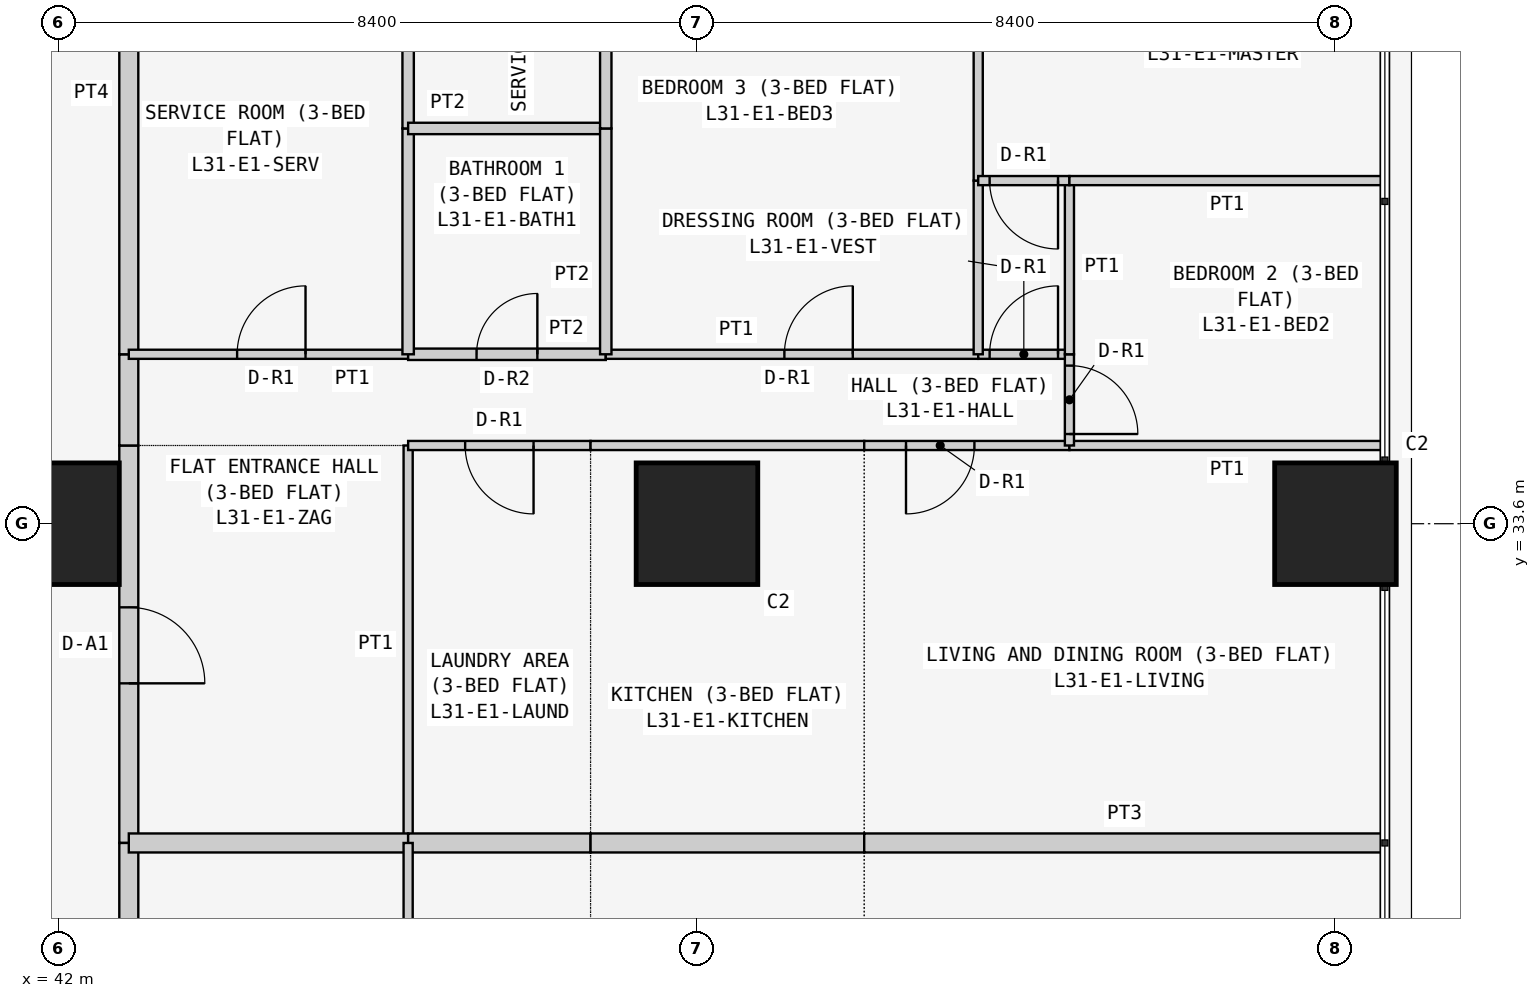
"""IFC4 building model, lengths in metres.
Left out: names, types, materials, properties, quantities, classifications, styles, units other than length and angle.
Written with IfcOpenShell. Run it as: python <this file> out.ifc"""

import sys

from ifc_helpers import new_model, si_unit, direction, frame, frame_2d, origin, origin_2d, place, context, subcontext, project, spatial, rectangle, extrude, element, fill, save


model = new_model("IFC4")
c1 = context("Model", 3, precision=1e-05, world=origin(), true_north=direction((0.0, 1.0)))
c2 = subcontext(c1, "Body", "Model", "MODEL_VIEW")
j1 = project(units=[si_unit("LENGTHUNIT", "METRE"), si_unit("PLANEANGLEUNIT", "RADIAN")], contexts=[c1])
p1 = place(None, origin())
s1 = spatial("IfcSite", under=j1, at=p1, CompositionType="ELEMENT")
p2 = place(p1, origin())
s2 = spatial("IfcBuilding", under=s1, at=p2, CompositionType="ELEMENT")
p3 = place(p2, frame((0.0, 0.0, 123.3)))
s3 = spatial("IfcBuildingStorey", under=s2, at=p3, CompositionType="ELEMENT", Elevation=123.3)
for number, where, z_axis, x_axis in (
    (1, (42.0, 33.6, 0.0), (0.0, 0.0, 1.0), (1.0, 0.0, 0.0)),
    (2, (50.4, 33.6, 0.0), (0.0, 0.0, 1.0), (1.0, 0.0, 0.0)),
    (3, (58.8, 33.6, 0.0), (0.0, 0.0, 1.0), (1.0, 0.0, 0.0)),
):
    element("IfcColumn", number, at=place(p3, frame(where, z_axis=z_axis, x_axis=x_axis)), inside=s3, PredefinedType="COLUMN", context=c2, shape_type="SweptSolid", body=[
        extrude(rectangle(XDim=1.6, YDim=1.6, at=origin_2d()), origin(), (0.0, 0.0, 1.0), 3.6),
    ])
p4 = place(p3, frame((42.925, 34.629, 0.0), z_axis=(0.0, 0.0, 1.0), x_axis=(0.0, -1.0, 0.0)))
e4 = element("IfcWall", 4, at=p4, inside=s3, PredefinedType="PARTITIONING", context=c2, shape_type="SweptSolid", body=[
    extrude(rectangle(XDim=5.229, YDim=0.25, at=frame_2d((2.615, 0.0))), origin(), (0.0, 0.0, 1.0), 3.45),
])
p5 = place(p4, frame((2.129, 0.0, 0.0)))
e5 = element("IfcOpeningElement", 5, at=p5, cuts=e4, PredefinedType="OPENING", context=c2, shape_type="SweptSolid", body=[
    extrude(rectangle(XDim=1.0, YDim=2.1, at=frame_2d((0.5, 1.05))), frame((0.0, 0.135, 0.0), z_axis=(0.0, -1.0, 0.0), x_axis=(1.0, 0.0, 0.0)), (0.0, 0.0, 1.0), 0.27),
])
p6 = place(p3, frame((42.925, 35.829, 0.0), z_axis=(0.0, 0.0, 1.0), x_axis=(0.0, -1.0, 0.0)))
e6 = element("IfcWall", 6, at=p6, inside=s3, PredefinedType="PARTITIONING", context=c2, shape_type="SweptSolid", body=[
    extrude(rectangle(XDim=1.2, YDim=0.25, at=frame_2d((0.6, 0.0))), origin(), (0.0, 0.0, 1.0), 3.45),
])
p7 = place(p3, frame((42.925, 42.7, 0.0), z_axis=(0.0, 0.0, 1.0), x_axis=(0.0, -1.0, 0.0)))
e7 = element("IfcWall", 7, at=p7, inside=s3, PredefinedType="PARTITIONING", context=c2, shape_type="SweptSolid", body=[
    extrude(rectangle(XDim=6.871, YDim=0.25, at=frame_2d((3.436, 0.0))), origin(), (0.0, 0.0, 1.0), 3.45),
])
p8 = place(p3, frame((42.925, 29.4, 0.0), z_axis=(0.0, 0.0, 1.0), x_axis=(0.0, -1.0, 0.0)))
e8 = element("IfcWall", 8, at=p8, inside=s3, PredefinedType="PARTITIONING", context=c2, shape_type="SweptSolid", body=[
    extrude(rectangle(XDim=5.229, YDim=0.25, at=frame_2d((2.615, 0.0))), origin(), (0.0, 0.0, 1.0), 3.45),
])
p9 = place(p8, frame((2.1, 0.0, 0.0)))
e9 = element("IfcOpeningElement", 9, at=p9, cuts=e8, PredefinedType="OPENING", context=c2, shape_type="SweptSolid", body=[
    extrude(rectangle(XDim=1.0, YDim=2.1, at=frame_2d((0.5, 1.05))), frame((0.0, 0.135, 0.0), z_axis=(0.0, -1.0, 0.0), x_axis=(1.0, 0.0, 0.0)), (0.0, 0.0, 1.0), 0.27),
])
p10 = place(p3, frame((46.6, 29.4, 0.0), z_axis=(0.0, 0.0, 1.0), x_axis=(0.0, 1.0, 0.0)))
e10 = element("IfcWall", 10, at=p10, inside=s3, PredefinedType="PARTITIONING", context=c2, shape_type="SweptSolid", body=[
    extrude(rectangle(XDim=5.229, YDim=0.12, at=frame_2d((2.615, 0.0))), origin(), (0.0, 0.0, 1.0), 3.45),
])
p11 = place(p3, frame((42.925, 29.4, 0.0), z_axis=(0.0, 0.0, 1.0), x_axis=(1.0, 0.0, 0.0)))
e11 = element("IfcWall", 11, at=p11, inside=s3, PredefinedType="PARTITIONING", context=c2, shape_type="SweptSolid", body=[
    extrude(rectangle(XDim=3.675, YDim=0.25, at=frame_2d((1.837, 0.0))), origin(), (0.0, 0.0, 1.0), 3.45),
])
p12 = place(p3, frame((49.0, 34.629, 0.0), z_axis=(0.0, 0.0, 1.0), x_axis=(-1.0, 0.0, 0.0)))
e12 = element("IfcWall", 12, at=p12, inside=s3, PredefinedType="PARTITIONING", context=c2, shape_type="SweptSolid", body=[
    extrude(rectangle(XDim=2.4, YDim=0.12, at=frame_2d((1.2, 0.0))), origin(), (0.0, 0.0, 1.0), 3.45),
])
p13 = place(p12, frame((0.75, 0.0, 0.0)))
e13 = element("IfcOpeningElement", 13, at=p13, cuts=e12, PredefinedType="OPENING", context=c2, shape_type="SweptSolid", body=[
    extrude(rectangle(XDim=0.9, YDim=2.1, at=frame_2d((0.45, 1.05))), frame((0.0, 0.07, 0.0), z_axis=(0.0, -1.0, 0.0), x_axis=(1.0, 0.0, 0.0)), (0.0, 0.0, 1.0), 0.14),
])
p14 = place(p3, frame((46.6, 29.4, 0.0), z_axis=(0.0, 0.0, 1.0), x_axis=(1.0, 0.0, 0.0)))
e14 = element("IfcWall", 14, at=p14, inside=s3, PredefinedType="PARTITIONING", context=c2, shape_type="SweptSolid", body=[
    extrude(rectangle(XDim=2.4, YDim=0.25, at=frame_2d((1.2, 0.0))), origin(), (0.0, 0.0, 1.0), 3.45),
])
p15 = place(p3, frame((52.6, 34.629, 0.0), z_axis=(0.0, 0.0, 1.0), x_axis=(-1.0, 0.0, 0.0)))
e15 = element("IfcWall", 15, at=p15, inside=s3, PredefinedType="PARTITIONING", context=c2, shape_type="SweptSolid", body=[
    extrude(rectangle(XDim=3.6, YDim=0.12, at=frame_2d((1.8, 0.0))), origin(), (0.0, 0.0, 1.0), 3.45),
])
p16 = place(p3, frame((49.0, 29.4, 0.0), z_axis=(0.0, 0.0, 1.0), x_axis=(1.0, 0.0, 0.0)))
e16 = element("IfcWall", 16, at=p16, inside=s3, PredefinedType="PARTITIONING", context=c2, shape_type="SweptSolid", body=[
    extrude(rectangle(XDim=3.6, YDim=0.25, at=frame_2d((1.8, 0.0))), origin(), (0.0, 0.0, 1.0), 3.45),
])
p17 = place(p3, frame((55.3, 34.629, 0.0), z_axis=(0.0, 0.0, 1.0), x_axis=(-1.0, 0.0, 0.0)))
e17 = element("IfcWall", 17, at=p17, inside=s3, PredefinedType="PARTITIONING", context=c2, shape_type="SweptSolid", body=[
    extrude(rectangle(XDim=2.7, YDim=0.12, at=frame_2d((1.35, 0.0))), origin(), (0.0, 0.0, 1.0), 3.45),
])
p18 = place(p17, frame((1.25, 0.0, 0.0)))
e18 = element("IfcOpeningElement", 18, at=p18, cuts=e17, PredefinedType="OPENING", context=c2, shape_type="SweptSolid", body=[
    extrude(rectangle(XDim=0.9, YDim=2.1, at=frame_2d((0.45, 1.05))), frame((0.0, 0.07, 0.0), z_axis=(0.0, -1.0, 0.0), x_axis=(1.0, 0.0, 0.0)), (0.0, 0.0, 1.0), 0.14),
])
p19 = place(p3, frame((59.45, 34.629, 0.0), z_axis=(0.0, 0.0, 1.0), x_axis=(-1.0, 0.0, 0.0)))
e19 = element("IfcWall", 19, at=p19, inside=s3, PredefinedType="PARTITIONING", context=c2, shape_type="SweptSolid", body=[
    extrude(rectangle(XDim=4.15, YDim=0.12, at=frame_2d((2.075, 0.0))), origin(), (0.0, 0.0, 1.0), 3.45),
])
p20 = place(p3, frame((52.6, 29.4, 0.0), z_axis=(0.0, 0.0, 1.0), x_axis=(1.0, 0.0, 0.0)))
e20 = element("IfcWall", 20, at=p20, inside=s3, PredefinedType="PARTITIONING", context=c2, shape_type="SweptSolid", body=[
    extrude(rectangle(XDim=6.85, YDim=0.25, at=frame_2d((3.425, 0.0))), origin(), (0.0, 0.0, 1.0), 3.45),
])
p21 = place(p3, frame((46.6, 35.829, 0.0), z_axis=(0.0, 0.0, 1.0), x_axis=(-1.0, 0.0, 0.0)))
e21 = element("IfcWall", 21, at=p21, inside=s3, PredefinedType="PARTITIONING", context=c2, shape_type="SweptSolid", body=[
    extrude(rectangle(XDim=3.675, YDim=0.12, at=frame_2d((1.837, 0.0))), origin(), (0.0, 0.0, 1.0), 3.45),
])
p22 = place(p21, frame((1.35, 0.0, 0.0)))
e22 = element("IfcOpeningElement", 22, at=p22, cuts=e21, PredefinedType="OPENING", context=c2, shape_type="SweptSolid", body=[
    extrude(rectangle(XDim=0.9, YDim=2.1, at=frame_2d((0.45, 1.05))), frame((0.0, 0.07, 0.0), z_axis=(0.0, -1.0, 0.0), x_axis=(1.0, 0.0, 0.0)), (0.0, 0.0, 1.0), 0.14),
])
p23 = place(p3, frame((49.2, 35.829, 0.0), z_axis=(0.0, 0.0, 1.0), x_axis=(-1.0, 0.0, 0.0)))
e23 = element("IfcWall", 23, at=p23, inside=s3, PredefinedType="PARTITIONING", context=c2, shape_type="SweptSolid", body=[
    extrude(rectangle(XDim=2.6, YDim=0.15, at=frame_2d((1.3, 0.0))), origin(), (0.0, 0.0, 1.0), 3.45),
])
p24 = place(p23, frame((0.9, 0.0, 0.0)))
e24 = element("IfcOpeningElement", 24, at=p24, cuts=e23, PredefinedType="OPENING", context=c2, shape_type="SweptSolid", body=[
    extrude(rectangle(XDim=0.8, YDim=2.1, at=frame_2d((0.4, 1.05))), frame((0.0, 0.085, 0.0), z_axis=(0.0, -1.0, 0.0), x_axis=(1.0, 0.0, 0.0)), (0.0, 0.0, 1.0), 0.17),
])
p25 = place(p3, frame((54.1, 35.829, 0.0), z_axis=(0.0, 0.0, 1.0), x_axis=(-1.0, 0.0, 0.0)))
e25 = element("IfcWall", 25, at=p25, inside=s3, PredefinedType="PARTITIONING", context=c2, shape_type="SweptSolid", body=[
    extrude(rectangle(XDim=4.9, YDim=0.12, at=frame_2d((2.45, 0.0))), origin(), (0.0, 0.0, 1.0), 3.45),
])
p26 = place(p25, frame((1.65, 0.0, 0.0)))
e26 = element("IfcOpeningElement", 26, at=p26, cuts=e25, PredefinedType="OPENING", context=c2, shape_type="SweptSolid", body=[
    extrude(rectangle(XDim=0.9, YDim=2.1, at=frame_2d((0.45, 1.05))), frame((0.0, 0.07, 0.0), z_axis=(0.0, -1.0, 0.0), x_axis=(1.0, 0.0, 0.0)), (0.0, 0.0, 1.0), 0.14),
])
p27 = place(p3, frame((55.3, 35.829, 0.0), z_axis=(0.0, 0.0, 1.0), x_axis=(-1.0, 0.0, 0.0)))
e27 = element("IfcWall", 27, at=p27, inside=s3, PredefinedType="PARTITIONING", context=c2, shape_type="SweptSolid", body=[
    extrude(rectangle(XDim=1.2, YDim=0.12, at=frame_2d((0.6, 0.0))), origin(), (0.0, 0.0, 1.0), 3.45),
])
p28 = place(p27, frame((0.15, 0.0, 0.0)))
e28 = element("IfcOpeningElement", 28, at=p28, cuts=e27, PredefinedType="OPENING", context=c2, shape_type="SweptSolid", body=[
    extrude(rectangle(XDim=0.9, YDim=2.1, at=frame_2d((0.45, 1.05))), frame((0.0, 0.07, 0.0), z_axis=(0.0, -1.0, 0.0), x_axis=(1.0, 0.0, 0.0)), (0.0, 0.0, 1.0), 0.14),
])
p29 = place(p3, frame((55.3, 34.629, 0.0), z_axis=(0.0, 0.0, 1.0), x_axis=(0.0, 1.0, 0.0)))
e29 = element("IfcWall", 29, at=p29, inside=s3, PredefinedType="PARTITIONING", context=c2, shape_type="SweptSolid", body=[
    extrude(rectangle(XDim=1.2, YDim=0.12, at=frame_2d((0.6, 0.0))), origin(), (0.0, 0.0, 1.0), 3.45),
])
p30 = place(p29, frame((0.151, 0.0, 0.0)))
e30 = element("IfcOpeningElement", 30, at=p30, cuts=e29, PredefinedType="OPENING", context=c2, shape_type="SweptSolid", body=[
    extrude(rectangle(XDim=0.9, YDim=2.1, at=frame_2d((0.45, 1.05))), frame((0.0, 0.07, 0.0), z_axis=(0.0, -1.0, 0.0), x_axis=(1.0, 0.0, 0.0)), (0.0, 0.0, 1.0), 0.14),
])
p31 = place(p3, frame((46.6, 35.829, 0.0), z_axis=(0.0, 0.0, 1.0), x_axis=(0.0, 1.0, 0.0)))
e31 = element("IfcWall", 31, at=p31, inside=s3, PredefinedType="PARTITIONING", context=c2, shape_type="SweptSolid", body=[
    extrude(rectangle(XDim=2.971, YDim=0.15, at=frame_2d((1.485, 0.0))), origin(), (0.0, 0.0, 1.0), 3.45),
])
p32 = place(p3, frame((46.6, 38.8, 0.0), z_axis=(0.0, 0.0, 1.0), x_axis=(0.0, 1.0, 0.0)))
e32 = element("IfcWall", 32, at=p32, inside=s3, PredefinedType="PARTITIONING", context=c2, shape_type="SweptSolid", body=[
    extrude(rectangle(XDim=3.9, YDim=0.15, at=frame_2d((1.95, 0.0))), origin(), (0.0, 0.0, 1.0), 3.45),
])
p33 = place(p32, frame((1.45, 0.0, 0.0)))
e33 = element("IfcOpeningElement", 33, at=p33, cuts=e32, PredefinedType="OPENING", context=c2, shape_type="SweptSolid", body=[
    extrude(rectangle(XDim=0.8, YDim=2.1, at=frame_2d((0.4, 1.05))), frame((0.0, 0.085, 0.0), z_axis=(0.0, -1.0, 0.0), x_axis=(1.0, 0.0, 0.0)), (0.0, 0.0, 1.0), 0.17),
])
p34 = place(p3, frame((49.2, 38.8, 0.0), z_axis=(0.0, 0.0, 1.0), x_axis=(-1.0, 0.0, 0.0)))
e34 = element("IfcWall", 34, at=p34, inside=s3, PredefinedType="PARTITIONING", context=c2, shape_type="SweptSolid", body=[
    extrude(rectangle(XDim=2.6, YDim=0.15, at=frame_2d((1.3, 0.0))), origin(), (0.0, 0.0, 1.0), 3.45),
])
p35 = place(p3, frame((49.2, 35.829, 0.0), z_axis=(0.0, 0.0, 1.0), x_axis=(0.0, 1.0, 0.0)))
e35 = element("IfcWall", 35, at=p35, inside=s3, PredefinedType="PARTITIONING", context=c2, shape_type="SweptSolid", body=[
    extrude(rectangle(XDim=2.971, YDim=0.15, at=frame_2d((1.485, 0.0))), origin(), (0.0, 0.0, 1.0), 3.45),
])
p36 = place(p3, frame((49.2, 38.8, 0.0), z_axis=(0.0, 0.0, 1.0), x_axis=(0.0, 1.0, 0.0)))
e36 = element("IfcWall", 36, at=p36, inside=s3, PredefinedType="PARTITIONING", context=c2, shape_type="SweptSolid", body=[
    extrude(rectangle(XDim=3.9, YDim=0.15, at=frame_2d((1.95, 0.0))), origin(), (0.0, 0.0, 1.0), 3.45),
])
p37 = place(p3, frame((54.1, 35.829, 0.0), z_axis=(0.0, 0.0, 1.0), x_axis=(0.0, 1.0, 0.0)))
e37 = element("IfcWall", 37, at=p37, inside=s3, PredefinedType="PARTITIONING", context=c2, shape_type="SweptSolid", body=[
    extrude(rectangle(XDim=2.285, YDim=0.12, at=frame_2d((1.143, 0.0))), origin(), (0.0, 0.0, 1.0), 3.45),
])
p38 = place(p3, frame((54.1, 38.114, 0.0), z_axis=(0.0, 0.0, 1.0), x_axis=(0.0, 1.0, 0.0)))
e38 = element("IfcWall", 38, at=p38, inside=s3, PredefinedType="PARTITIONING", context=c2, shape_type="SweptSolid", body=[
    extrude(rectangle(XDim=4.586, YDim=0.12, at=frame_2d((2.293, 0.0))), origin(), (0.0, 0.0, 1.0), 3.45),
])
p39 = place(p3, frame((55.3, 35.829, 0.0), z_axis=(0.0, 0.0, 1.0), x_axis=(0.0, 1.0, 0.0)))
e39 = element("IfcWall", 39, at=p39, inside=s3, PredefinedType="PARTITIONING", context=c2, shape_type="SweptSolid", body=[
    extrude(rectangle(XDim=2.285, YDim=0.12, at=frame_2d((1.143, 0.0))), origin(), (0.0, 0.0, 1.0), 3.45),
])
p40 = place(p3, frame((55.3, 38.114, 0.0), z_axis=(0.0, 0.0, 1.0), x_axis=(-1.0, 0.0, 0.0)))
e40 = element("IfcWall", 40, at=p40, inside=s3, PredefinedType="PARTITIONING", context=c2, shape_type="SweptSolid", body=[
    extrude(rectangle(XDim=1.2, YDim=0.12, at=frame_2d((0.6, 0.0))), origin(), (0.0, 0.0, 1.0), 3.45),
])
p41 = place(p40, frame((0.15, 0.0, 0.0)))
e41 = element("IfcOpeningElement", 41, at=p41, cuts=e40, PredefinedType="OPENING", context=c2, shape_type="SweptSolid", body=[
    extrude(rectangle(XDim=0.9, YDim=2.1, at=frame_2d((0.45, 1.05))), frame((0.0, 0.07, 0.0), z_axis=(0.0, -1.0, 0.0), x_axis=(1.0, 0.0, 0.0)), (0.0, 0.0, 1.0), 0.14),
])
p42 = place(p3, frame((59.45, 38.114, 0.0), z_axis=(0.0, 0.0, 1.0), x_axis=(-1.0, 0.0, 0.0)))
e42 = element("IfcWall", 42, at=p42, inside=s3, PredefinedType="PARTITIONING", context=c2, shape_type="SweptSolid", body=[
    extrude(rectangle(XDim=4.15, YDim=0.12, at=frame_2d((2.075, 0.0))), origin(), (0.0, 0.0, 1.0), 3.45),
])
p43 = place(p3, frame((46.6, 29.4, 0.0), z_axis=(0.0, 0.0, 1.0), x_axis=(0.0, -1.0, 0.0)))
e43 = element("IfcWall", 43, at=p43, inside=s3, PredefinedType="PARTITIONING", context=c2, shape_type="SweptSolid", body=[
    extrude(rectangle(XDim=5.229, YDim=0.12, at=frame_2d((2.615, 0.0))), origin(), (0.0, 0.0, 1.0), 3.45),
])
p44 = place(p5, origin())
e44 = element("IfcDoor", 44, at=p44, inside=s3, OperationType="SINGLE_SWING_RIGHT", PredefinedType="DOOR", context=c2, shape_type="SweptSolid", body=[
    extrude(rectangle(XDim=1.0, YDim=2.1, at=frame_2d((0.5, 1.05))), frame((0.0, 0.025, 0.0), z_axis=(0.0, -1.0, 0.0), x_axis=(1.0, 0.0, 0.0)), (0.0, 0.0, 1.0), 0.05),
])
fill(e5, e44)
p45 = place(p13, origin())
e45 = element("IfcDoor", 45, at=p45, inside=s3, OperationType="SINGLE_SWING_LEFT", PredefinedType="DOOR", context=c2, shape_type="SweptSolid", body=[
    extrude(rectangle(XDim=0.9, YDim=2.1, at=frame_2d((0.45, 1.05))), frame((0.0, 0.025, 0.0), z_axis=(0.0, -1.0, 0.0), x_axis=(1.0, 0.0, 0.0)), (0.0, 0.0, 1.0), 0.05),
])
fill(e13, e45)
p46 = place(p18, origin())
e46 = element("IfcDoor", 46, at=p46, inside=s3, OperationType="SINGLE_SWING_RIGHT", PredefinedType="DOOR", context=c2, shape_type="SweptSolid", body=[
    extrude(rectangle(XDim=0.9, YDim=2.1, at=frame_2d((0.45, 1.05))), frame((0.0, 0.025, 0.0), z_axis=(0.0, -1.0, 0.0), x_axis=(1.0, 0.0, 0.0)), (0.0, 0.0, 1.0), 0.05),
])
fill(e18, e46)
p47 = place(p22, frame((0.9, 0.0, 0.0), z_axis=(0.0, 0.0, 1.0), x_axis=(-1.0, 0.0, 0.0)))
e47 = element("IfcDoor", 47, at=p47, inside=s3, OperationType="SINGLE_SWING_RIGHT", PredefinedType="DOOR", context=c2, shape_type="SweptSolid", body=[
    extrude(rectangle(XDim=0.9, YDim=2.1, at=frame_2d((0.45, 1.05))), frame((0.0, 0.025, 0.0), z_axis=(0.0, -1.0, 0.0), x_axis=(1.0, 0.0, 0.0)), (0.0, 0.0, 1.0), 0.05),
])
fill(e22, e47)
p48 = place(p24, frame((0.8, 0.0, 0.0), z_axis=(0.0, 0.0, 1.0), x_axis=(-1.0, 0.0, 0.0)))
e48 = element("IfcDoor", 48, at=p48, inside=s3, OperationType="SINGLE_SWING_RIGHT", PredefinedType="DOOR", context=c2, shape_type="SweptSolid", body=[
    extrude(rectangle(XDim=0.8, YDim=2.1, at=frame_2d((0.4, 1.05))), frame((0.0, 0.025, 0.0), z_axis=(0.0, -1.0, 0.0), x_axis=(1.0, 0.0, 0.0)), (0.0, 0.0, 1.0), 0.05),
])
fill(e24, e48)
p49 = place(p26, frame((0.9, 0.0, 0.0), z_axis=(0.0, 0.0, 1.0), x_axis=(-1.0, 0.0, 0.0)))
e49 = element("IfcDoor", 49, at=p49, inside=s3, OperationType="SINGLE_SWING_RIGHT", PredefinedType="DOOR", context=c2, shape_type="SweptSolid", body=[
    extrude(rectangle(XDim=0.9, YDim=2.1, at=frame_2d((0.45, 1.05))), frame((0.0, 0.025, 0.0), z_axis=(0.0, -1.0, 0.0), x_axis=(1.0, 0.0, 0.0)), (0.0, 0.0, 1.0), 0.05),
])
fill(e26, e49)
p50 = place(p28, frame((0.9, 0.0, 0.0), z_axis=(0.0, 0.0, 1.0), x_axis=(-1.0, 0.0, 0.0)))
e50 = element("IfcDoor", 50, at=p50, inside=s3, OperationType="SINGLE_SWING_RIGHT", PredefinedType="DOOR", context=c2, shape_type="SweptSolid", body=[
    extrude(rectangle(XDim=0.9, YDim=2.1, at=frame_2d((0.45, 1.05))), frame((0.0, 0.025, 0.0), z_axis=(0.0, -1.0, 0.0), x_axis=(1.0, 0.0, 0.0)), (0.0, 0.0, 1.0), 0.05),
])
fill(e28, e50)
p51 = place(p41, origin())
e51 = element("IfcDoor", 51, at=p51, inside=s3, OperationType="SINGLE_SWING_LEFT", PredefinedType="DOOR", context=c2, shape_type="SweptSolid", body=[
    extrude(rectangle(XDim=0.9, YDim=2.1, at=frame_2d((0.45, 1.05))), frame((0.0, 0.025, 0.0), z_axis=(0.0, -1.0, 0.0), x_axis=(1.0, 0.0, 0.0)), (0.0, 0.0, 1.0), 0.05),
])
fill(e41, e51)
p52 = place(p30, frame((0.9, 0.0, 0.0), z_axis=(0.0, 0.0, 1.0), x_axis=(-1.0, 0.0, 0.0)))
e52 = element("IfcDoor", 52, at=p52, inside=s3, OperationType="SINGLE_SWING_RIGHT", PredefinedType="DOOR", context=c2, shape_type="SweptSolid", body=[
    extrude(rectangle(XDim=0.9, YDim=2.1, at=frame_2d((0.45, 1.05))), frame((0.0, 0.025, 0.0), z_axis=(0.0, -1.0, 0.0), x_axis=(1.0, 0.0, 0.0)), (0.0, 0.0, 1.0), 0.05),
])
fill(e30, e52)
save(model, sys.argv[1])
